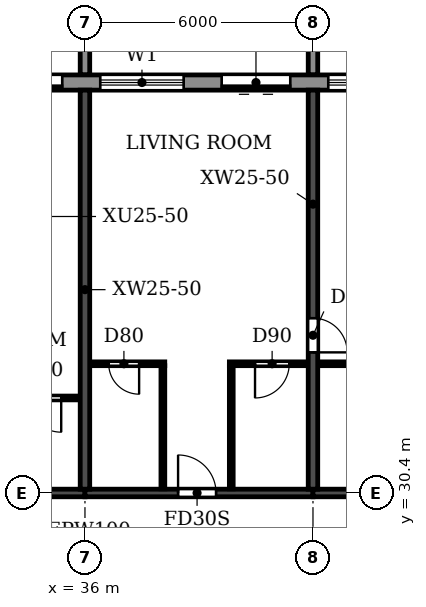
"""IFC4 building model, lengths in metres.
Left out: names, types, materials, properties, quantities, classifications, styles, units other than length and angle.
Written with IfcOpenShell. Run it as: python <this file> out.ifc"""

import sys

from ifc_helpers import new_model, si_unit, direction, frame, frame_2d, origin, place, context, subcontext, project, spatial, polyline, rectangle, outline, extrude, source, transform, mapped, element, fill, save


model = new_model("IFC4")
c1 = context("Model", 3, precision=1e-05, world=origin(), true_north=direction((0.0, 1.0)))
c2 = subcontext(c1, "Body", "Model", "MODEL_VIEW")
j1 = project(units=[si_unit("LENGTHUNIT", "METRE"), si_unit("PLANEANGLEUNIT", "RADIAN")], contexts=[c1])
p1 = place(None, origin())
s1 = spatial("IfcSite", under=j1, at=p1, CompositionType="ELEMENT")
p2 = place(p1, origin())
s2 = spatial("IfcBuilding", under=s1, at=p2, CompositionType="ELEMENT")
p3 = place(p2, frame((0.0, 0.0, 257.7)))
s3 = spatial("IfcBuildingStorey", under=s2, at=p3, CompositionType="ELEMENT", Elevation=257.7)
p4 = place(p3, frame((36.0, 30.5, 0.0), z_axis=(0.0, 0.0, 1.0), x_axis=(0.0, 1.0, 0.0)))
e1 = element("IfcWall", 1, at=p4, inside=s3, PredefinedType="SHEAR", context=c2, shape_type="SweptSolid", body=[
    extrude(rectangle(XDim=10.5, YDim=0.25, at=frame_2d((5.25, 0.0))), origin(), (0.0, 0.0, 1.0), 3.0),
])
p5 = place(p3, frame((42.0, 30.5, 0.0), z_axis=(0.0, 0.0, 1.0), x_axis=(0.0, 1.0, 0.0)))
e2 = element("IfcWall", 2, at=p5, inside=s3, PredefinedType="SHEAR", context=c2, shape_type="SweptSolid", body=[
    extrude(rectangle(XDim=10.5, YDim=0.25, at=frame_2d((5.25, 0.0))), origin(), (0.0, 0.0, 1.0), 3.0),
])
p6 = place(p5, frame((3.6, 0.0, 0.0)))
e3 = element("IfcOpeningElement", 3, at=p6, cuts=e2, PredefinedType="OPENING", context=c2, shape_type="SweptSolid", body=[
    extrude(rectangle(XDim=0.9, YDim=2.1, at=frame_2d((0.45, 1.05))), frame((0.0, 0.135, 0.0), z_axis=(0.0, -1.0, 0.0), x_axis=(1.0, 0.0, 0.0)), (0.0, 0.0, 1.0), 0.27),
])
p7 = place(p3, frame((30.0, 30.4, 0.0), z_axis=(0.0, 0.0, 1.0), x_axis=(1.0, 0.0, 0.0)))
e4 = element("IfcWall", 4, at=p7, inside=s3, PredefinedType="SHEAR", context=c2, shape_type="SweptSolid", body=[
    extrude(rectangle(XDim=6.0, YDim=0.2, at=frame_2d((3.0, 0.0))), origin(), (0.0, 0.0, 1.0), 2.4),
])
p8 = place(p7, frame((2.45, 0.0, 0.0)))
e5 = element("IfcOpeningElement", 5, at=p8, cuts=e4, PredefinedType="OPENING", context=c2, shape_type="SweptSolid", body=[
    extrude(rectangle(XDim=1.0, YDim=2.1, at=frame_2d((0.5, 1.05))), frame((0.0, 0.11, 0.0), z_axis=(0.0, -1.0, 0.0), x_axis=(1.0, 0.0, 0.0)), (0.0, 0.0, 1.0), 0.22),
])
p9 = place(p3, frame((36.0, 30.4, 0.0), z_axis=(0.0, 0.0, 1.0), x_axis=(1.0, 0.0, 0.0)))
e6 = element("IfcWall", 6, at=p9, inside=s3, PredefinedType="SHEAR", context=c2, shape_type="SweptSolid", body=[
    extrude(rectangle(XDim=6.0, YDim=0.2, at=frame_2d((3.0, 0.0))), origin(), (0.0, 0.0, 1.0), 2.4),
])
p10 = place(p9, frame((2.45, 0.0, 0.0)))
e7 = element("IfcOpeningElement", 7, at=p10, cuts=e6, PredefinedType="OPENING", context=c2, shape_type="SweptSolid", body=[
    extrude(rectangle(XDim=1.0, YDim=2.1, at=frame_2d((0.5, 1.05))), frame((0.0, 0.11, 0.0), z_axis=(0.0, -1.0, 0.0), x_axis=(1.0, 0.0, 0.0)), (0.0, 0.0, 1.0), 0.22),
])
p11 = place(p3, frame((42.0, 30.4, 0.0), z_axis=(0.0, 0.0, 1.0), x_axis=(1.0, 0.0, 0.0)))
e8 = element("IfcWall", 8, at=p11, inside=s3, PredefinedType="SHEAR", context=c2, shape_type="SweptSolid", body=[
    extrude(rectangle(XDim=6.0, YDim=0.2, at=frame_2d((3.0, 0.0))), origin(), (0.0, 0.0, 1.0), 2.4),
])
p12 = place(p3, frame((79.317, 41.2, 0.0), z_axis=(0.0, 0.0, 1.0), x_axis=(-1.0, 0.0, 0.0)))
e9 = element("IfcWall", 9, at=p12, inside=s3, PredefinedType="STANDARD", context=c2, shape_type="SweptSolid", body=[
    extrude(rectangle(XDim=56.634, YDim=0.4, at=frame_2d((28.317, 0.0))), origin(), (0.0, 0.0, 1.0), 3.0),
])
p13 = place(p12, frame((52.717, 0.0, 0.9)))
e10 = element("IfcOpeningElement", 10, at=p13, cuts=e9, PredefinedType="OPENING", context=c2, shape_type="SweptSolid", body=[
    extrude(rectangle(XDim=2.2, YDim=1.5, at=frame_2d((1.1, 0.75))), frame((0.0, 0.21, 0.0), z_axis=(0.0, -1.0, 0.0), x_axis=(1.0, 0.0, 0.0)), (0.0, 0.0, 1.0), 0.42),
])
p14 = place(p12, frame((49.717, 0.0, 0.9)))
e11 = element("IfcOpeningElement", 11, at=p14, cuts=e9, PredefinedType="OPENING", context=c2, shape_type="SweptSolid", body=[
    extrude(rectangle(XDim=2.2, YDim=1.5, at=frame_2d((1.1, 0.75))), frame((0.0, 0.21, 0.0), z_axis=(0.0, -1.0, 0.0), x_axis=(1.0, 0.0, 0.0)), (0.0, 0.0, 1.0), 0.42),
])
p15 = place(p12, frame((46.717, 0.0, 0.9)))
e12 = element("IfcOpeningElement", 12, at=p15, cuts=e9, PredefinedType="OPENING", context=c2, shape_type="SweptSolid", body=[
    extrude(rectangle(XDim=2.2, YDim=1.5, at=frame_2d((1.1, 0.75))), frame((0.0, 0.21, 0.0), z_axis=(0.0, -1.0, 0.0), x_axis=(1.0, 0.0, 0.0)), (0.0, 0.0, 1.0), 0.42),
])
p16 = place(p12, frame((43.917, 0.0, 0.0)))
e13 = element("IfcOpeningElement", 13, at=p16, cuts=e9, PredefinedType="OPENING", context=c2, shape_type="SweptSolid", body=[
    extrude(rectangle(XDim=1.8, YDim=2.4, at=frame_2d((0.9, 1.2))), frame((0.0, 0.21, 0.0), z_axis=(0.0, -1.0, 0.0), x_axis=(1.0, 0.0, 0.0)), (0.0, 0.0, 1.0), 0.42),
])
p17 = place(p12, frame((40.717, 0.0, 0.9)))
e14 = element("IfcOpeningElement", 14, at=p17, cuts=e9, PredefinedType="OPENING", context=c2, shape_type="SweptSolid", body=[
    extrude(rectangle(XDim=2.2, YDim=1.5, at=frame_2d((1.1, 0.75))), frame((0.0, 0.21, 0.0), z_axis=(0.0, -1.0, 0.0), x_axis=(1.0, 0.0, 0.0)), (0.0, 0.0, 1.0), 0.42),
])
p18 = place(p12, frame((37.917, 0.0, 0.0)))
e15 = element("IfcOpeningElement", 15, at=p18, cuts=e9, PredefinedType="OPENING", context=c2, shape_type="SweptSolid", body=[
    extrude(rectangle(XDim=1.8, YDim=2.4, at=frame_2d((0.9, 1.2))), frame((0.0, 0.21, 0.0), z_axis=(0.0, -1.0, 0.0), x_axis=(1.0, 0.0, 0.0)), (0.0, 0.0, 1.0), 0.42),
])
p19 = place(p12, frame((34.717, 0.0, 0.9)))
e16 = element("IfcOpeningElement", 16, at=p19, cuts=e9, PredefinedType="OPENING", context=c2, shape_type="SweptSolid", body=[
    extrude(rectangle(XDim=2.2, YDim=1.5, at=frame_2d((1.1, 0.75))), frame((0.0, 0.21, 0.0), z_axis=(0.0, -1.0, 0.0), x_axis=(1.0, 0.0, 0.0)), (0.0, 0.0, 1.0), 0.42),
])
p20 = place(p12, frame((31.717, 0.0, 0.9)))
e17 = element("IfcOpeningElement", 17, at=p20, cuts=e9, PredefinedType="OPENING", context=c2, shape_type="SweptSolid", body=[
    extrude(rectangle(XDim=2.2, YDim=1.5, at=frame_2d((1.1, 0.75))), frame((0.0, 0.21, 0.0), z_axis=(0.0, -1.0, 0.0), x_axis=(1.0, 0.0, 0.0)), (0.0, 0.0, 1.0), 0.42),
])
p21 = place(p12, frame((28.717, 0.0, 0.9)))
e18 = element("IfcOpeningElement", 18, at=p21, cuts=e9, PredefinedType="OPENING", context=c2, shape_type="SweptSolid", body=[
    extrude(rectangle(XDim=2.2, YDim=1.5, at=frame_2d((1.1, 0.75))), frame((0.0, 0.21, 0.0), z_axis=(0.0, -1.0, 0.0), x_axis=(1.0, 0.0, 0.0)), (0.0, 0.0, 1.0), 0.42),
])
p22 = place(p12, frame((25.917, 0.0, 0.0)))
e19 = element("IfcOpeningElement", 19, at=p22, cuts=e9, PredefinedType="OPENING", context=c2, shape_type="SweptSolid", body=[
    extrude(rectangle(XDim=1.8, YDim=2.4, at=frame_2d((0.9, 1.2))), frame((0.0, 0.21, 0.0), z_axis=(0.0, -1.0, 0.0), x_axis=(1.0, 0.0, 0.0)), (0.0, 0.0, 1.0), 0.42),
])
p23 = place(p12, frame((22.917, 0.0, 0.0)))
e20 = element("IfcOpeningElement", 20, at=p23, cuts=e9, PredefinedType="OPENING", context=c2, shape_type="SweptSolid", body=[
    extrude(rectangle(XDim=1.8, YDim=2.4, at=frame_2d((0.9, 1.2))), frame((0.0, 0.21, 0.0), z_axis=(0.0, -1.0, 0.0), x_axis=(1.0, 0.0, 0.0)), (0.0, 0.0, 1.0), 0.42),
])
p24 = place(p12, frame((19.717, 0.0, 0.9)))
e21 = element("IfcOpeningElement", 21, at=p24, cuts=e9, PredefinedType="OPENING", context=c2, shape_type="SweptSolid", body=[
    extrude(rectangle(XDim=2.2, YDim=1.5, at=frame_2d((1.1, 0.75))), frame((0.0, 0.21, 0.0), z_axis=(0.0, -1.0, 0.0), x_axis=(1.0, 0.0, 0.0)), (0.0, 0.0, 1.0), 0.42),
])
p25 = place(p12, frame((16.717, 0.0, 0.9)))
e22 = element("IfcOpeningElement", 22, at=p25, cuts=e9, PredefinedType="OPENING", context=c2, shape_type="SweptSolid", body=[
    extrude(rectangle(XDim=2.2, YDim=1.5, at=frame_2d((1.1, 0.75))), frame((0.0, 0.21, 0.0), z_axis=(0.0, -1.0, 0.0), x_axis=(1.0, 0.0, 0.0)), (0.0, 0.0, 1.0), 0.42),
])
p26 = place(p12, frame((13.717, 0.0, 0.9)))
e23 = element("IfcOpeningElement", 23, at=p26, cuts=e9, PredefinedType="OPENING", context=c2, shape_type="SweptSolid", body=[
    extrude(rectangle(XDim=2.2, YDim=1.5, at=frame_2d((1.1, 0.75))), frame((0.0, 0.21, 0.0), z_axis=(0.0, -1.0, 0.0), x_axis=(1.0, 0.0, 0.0)), (0.0, 0.0, 1.0), 0.42),
])
p27 = place(p12, frame((10.717, 0.0, 0.9)))
e24 = element("IfcOpeningElement", 24, at=p27, cuts=e9, PredefinedType="OPENING", context=c2, shape_type="SweptSolid", body=[
    extrude(rectangle(XDim=2.2, YDim=1.5, at=frame_2d((1.1, 0.75))), frame((0.0, 0.21, 0.0), z_axis=(0.0, -1.0, 0.0), x_axis=(1.0, 0.0, 0.0)), (0.0, 0.0, 1.0), 0.42),
])
p28 = place(p12, frame((7.917, 0.0, 0.0)))
e25 = element("IfcOpeningElement", 25, at=p28, cuts=e9, PredefinedType="OPENING", context=c2, shape_type="SweptSolid", body=[
    extrude(rectangle(XDim=1.8, YDim=2.4, at=frame_2d((0.9, 1.2))), frame((0.0, 0.21, 0.0), z_axis=(0.0, -1.0, 0.0), x_axis=(1.0, 0.0, 0.0)), (0.0, 0.0, 1.0), 0.42),
])
p29 = place(p12, frame((4.717, 0.0, 0.9)))
e26 = element("IfcOpeningElement", 26, at=p29, cuts=e9, PredefinedType="OPENING", context=c2, shape_type="SweptSolid", body=[
    extrude(rectangle(XDim=2.2, YDim=1.5, at=frame_2d((1.1, 0.75))), frame((0.0, 0.21, 0.0), z_axis=(0.0, -1.0, 0.0), x_axis=(1.0, 0.0, 0.0)), (0.0, 0.0, 1.0), 0.42),
])
p30 = place(p12, frame((1.917, 0.0, 0.0)))
e27 = element("IfcOpeningElement", 27, at=p30, cuts=e9, PredefinedType="OPENING", context=c2, shape_type="SweptSolid", body=[
    extrude(rectangle(XDim=1.8, YDim=2.4, at=frame_2d((0.9, 1.2))), frame((0.0, 0.21, 0.0), z_axis=(0.0, -1.0, 0.0), x_axis=(1.0, 0.0, 0.0)), (0.0, 0.0, 1.0), 0.42),
])
m1 = source(origin(), c2, "Body", "SweptSolid", [
    extrude(outline(polyline([(0.0, 0.0), (0.25, 0.0), (0.25, 3.1), (0.0, 3.1), (0.0, 0.0)])), origin(), (0.0, 0.0, 1.0), 3.1),
])
for number, where in (
    (28, (35.875, 41.4, 0.0)),
    (29, (41.875, 41.4, 0.0)),
):
    element("IfcWall", number, at=place(p3, frame(where)), inside=s3, PredefinedType="STANDARD", context=c2, shape_type="MappedRepresentation", body=[
        mapped(m1, transform((0.0, 0.0, 0.0))),
    ])
p31 = place(p3, frame((33.8, 32.9, 0.0), z_axis=(0.0, 0.0, 1.0), x_axis=(1.0, 0.0, 0.0)))
e30 = element("IfcWall", 30, at=p31, inside=s3, PredefinedType="PARTITIONING", context=c2, shape_type="SweptSolid", body=[
    extrude(rectangle(XDim=2.065, YDim=0.1, at=frame_2d((1.032, 0.0))), origin(), (0.0, 0.0, 1.0), 3.0),
])
p32 = place(p31, frame((0.675, 0.0, 0.0)))
e31 = element("IfcOpeningElement", 31, at=p32, cuts=e30, PredefinedType="OPENING", context=c2, shape_type="SweptSolid", body=[
    extrude(rectangle(XDim=0.9, YDim=2.1, at=frame_2d((0.45, 1.05))), frame((0.0, 0.06, 0.0), z_axis=(0.0, -1.0, 0.0), x_axis=(1.0, 0.0, 0.0)), (0.0, 0.0, 1.0), 0.12),
])
p33 = place(p3, frame((36.135, 33.8, 0.0), z_axis=(0.0, 0.0, 1.0), x_axis=(1.0, 0.0, 0.0)))
e32 = element("IfcWall", 32, at=p33, inside=s3, PredefinedType="PARTITIONING", context=c2, shape_type="SweptSolid", body=[
    extrude(rectangle(XDim=1.965, YDim=0.1, at=frame_2d((0.982, 0.0))), origin(), (0.0, 0.0, 1.0), 3.0),
])
p34 = place(p33, frame((0.49, 0.0, 0.0)))
e33 = element("IfcOpeningElement", 33, at=p34, cuts=e32, PredefinedType="OPENING", context=c2, shape_type="SweptSolid", body=[
    extrude(rectangle(XDim=0.8, YDim=2.1, at=frame_2d((0.4, 1.05))), frame((0.0, 0.06, 0.0), z_axis=(0.0, -1.0, 0.0), x_axis=(1.0, 0.0, 0.0)), (0.0, 0.0, 1.0), 0.12),
])
p35 = place(p3, frame((39.8, 33.8, 0.0), z_axis=(0.0, 0.0, 1.0), x_axis=(1.0, 0.0, 0.0)))
e34 = element("IfcWall", 34, at=p35, inside=s3, PredefinedType="PARTITIONING", context=c2, shape_type="SweptSolid", body=[
    extrude(rectangle(XDim=2.065, YDim=0.1, at=frame_2d((1.032, 0.0))), origin(), (0.0, 0.0, 1.0), 3.0),
])
p36 = place(p35, frame((0.675, 0.0, 0.0)))
e35 = element("IfcOpeningElement", 35, at=p36, cuts=e34, PredefinedType="OPENING", context=c2, shape_type="SweptSolid", body=[
    extrude(rectangle(XDim=0.9, YDim=2.1, at=frame_2d((0.45, 1.05))), frame((0.0, 0.06, 0.0), z_axis=(0.0, -1.0, 0.0), x_axis=(1.0, 0.0, 0.0)), (0.0, 0.0, 1.0), 0.12),
])
p37 = place(p3, frame((42.135, 33.8, 0.0), z_axis=(0.0, 0.0, 1.0), x_axis=(1.0, 0.0, 0.0)))
e36 = element("IfcWall", 36, at=p37, inside=s3, PredefinedType="PARTITIONING", context=c2, shape_type="SweptSolid", body=[
    extrude(rectangle(XDim=2.965, YDim=0.1, at=frame_2d((1.482, 0.0))), origin(), (0.0, 0.0, 1.0), 3.0),
])
p38 = place(p37, frame((0.965, 0.0, 0.0)))
e37 = element("IfcOpeningElement", 37, at=p38, cuts=e36, PredefinedType="OPENING", context=c2, shape_type="SweptSolid", body=[
    extrude(rectangle(XDim=0.8, YDim=2.1, at=frame_2d((0.4, 1.05))), frame((0.0, 0.06, 0.0), z_axis=(0.0, -1.0, 0.0), x_axis=(1.0, 0.0, 0.0)), (0.0, 0.0, 1.0), 0.12),
])
for number, where, z_axis, x_axis in (
    (38, (38.05, 30.51, 0.0), (0.0, 0.0, 1.0), (0.0, 1.0, 0.0)),
    (39, (39.85, 30.51, 0.0), (0.0, 0.0, 1.0), (0.0, 1.0, 0.0)),
):
    element("IfcWall", number, at=place(p3, frame(where, z_axis=z_axis, x_axis=x_axis)), inside=s3, PredefinedType="PARTITIONING", context=c2, shape_type="SweptSolid", body=[
        extrude(rectangle(XDim=3.24, YDim=0.1, at=frame_2d((1.62, 0.0))), origin(), (0.0, 0.0, 1.0), 3.0),
    ])
p39 = place(p16, origin())
e40 = element("IfcDoor", 40, at=p39, inside=s3, OperationType="DOUBLE_DOOR_SLIDING", PredefinedType="DOOR", context=c2, shape_type="SweptSolid", body=[
    extrude(rectangle(XDim=1.8, YDim=2.4, at=frame_2d((0.9, 1.2))), frame((0.0, 0.025, 0.0), z_axis=(0.0, -1.0, 0.0), x_axis=(1.0, 0.0, 0.0)), (0.0, 0.0, 1.0), 0.05),
])
fill(e13, e40)
p40 = place(p17, origin())
e41 = element("IfcWindow", 41, at=p40, inside=s3, PartitioningType="DOUBLE_PANEL_HORIZONTAL", PredefinedType="WINDOW", context=c2, shape_type="SweptSolid", body=[
    extrude(rectangle(XDim=2.2, YDim=1.5, at=frame_2d((1.1, 0.75))), frame((0.0, 0.03, 0.0), z_axis=(0.0, -1.0, 0.0), x_axis=(1.0, 0.0, 0.0)), (0.0, 0.0, 1.0), 0.06),
])
fill(e14, e41)
p41 = place(p18, origin())
e42 = element("IfcDoor", 42, at=p41, inside=s3, OperationType="DOUBLE_DOOR_SLIDING", PredefinedType="DOOR", context=c2, shape_type="SweptSolid", body=[
    extrude(rectangle(XDim=1.8, YDim=2.4, at=frame_2d((0.9, 1.2))), frame((0.0, 0.025, 0.0), z_axis=(0.0, -1.0, 0.0), x_axis=(1.0, 0.0, 0.0)), (0.0, 0.0, 1.0), 0.05),
])
fill(e15, e42)
p42 = place(p19, origin())
e43 = element("IfcWindow", 43, at=p42, inside=s3, PartitioningType="DOUBLE_PANEL_HORIZONTAL", PredefinedType="WINDOW", context=c2, shape_type="SweptSolid", body=[
    extrude(rectangle(XDim=2.2, YDim=1.5, at=frame_2d((1.1, 0.75))), frame((0.0, 0.03, 0.0), z_axis=(0.0, -1.0, 0.0), x_axis=(1.0, 0.0, 0.0)), (0.0, 0.0, 1.0), 0.06),
])
fill(e16, e43)
p43 = place(p32, frame((0.9, 0.0, 0.0), z_axis=(0.0, 0.0, 1.0), x_axis=(-1.0, 0.0, 0.0)))
e44 = element("IfcDoor", 44, at=p43, inside=s3, OperationType="SINGLE_SWING_LEFT", PredefinedType="DOOR", context=c2, shape_type="SweptSolid", body=[
    extrude(rectangle(XDim=0.9, YDim=2.1, at=frame_2d((0.45, 1.05))), frame((0.0, 0.025, 0.0), z_axis=(0.0, -1.0, 0.0), x_axis=(1.0, 0.0, 0.0)), (0.0, 0.0, 1.0), 0.05),
])
fill(e31, e44)
p44 = place(p34, frame((0.8, 0.0, 0.0), z_axis=(0.0, 0.0, 1.0), x_axis=(-1.0, 0.0, 0.0)))
e45 = element("IfcDoor", 45, at=p44, inside=s3, OperationType="SINGLE_SWING_LEFT", PredefinedType="DOOR", context=c2, shape_type="SweptSolid", body=[
    extrude(rectangle(XDim=0.8, YDim=2.1, at=frame_2d((0.4, 1.05))), frame((0.0, 0.025, 0.0), z_axis=(0.0, -1.0, 0.0), x_axis=(1.0, 0.0, 0.0)), (0.0, 0.0, 1.0), 0.05),
])
fill(e33, e45)
p45 = place(p10, origin())
e46 = element("IfcDoor", 46, at=p45, inside=s3, OperationType="SINGLE_SWING_LEFT", PredefinedType="DOOR", context=c2, shape_type="SweptSolid", body=[
    extrude(rectangle(XDim=1.0, YDim=2.1, at=frame_2d((0.5, 1.05))), frame((0.0, 0.025, 0.0), z_axis=(0.0, -1.0, 0.0), x_axis=(1.0, 0.0, 0.0)), (0.0, 0.0, 1.0), 0.05),
])
fill(e7, e46)
p46 = place(p36, frame((0.9, 0.0, 0.0), z_axis=(0.0, 0.0, 1.0), x_axis=(-1.0, 0.0, 0.0)))
e47 = element("IfcDoor", 47, at=p46, inside=s3, OperationType="SINGLE_SWING_RIGHT", PredefinedType="DOOR", context=c2, shape_type="SweptSolid", body=[
    extrude(rectangle(XDim=0.9, YDim=2.1, at=frame_2d((0.45, 1.05))), frame((0.0, 0.025, 0.0), z_axis=(0.0, -1.0, 0.0), x_axis=(1.0, 0.0, 0.0)), (0.0, 0.0, 1.0), 0.05),
])
fill(e35, e47)
p47 = place(p6, frame((0.9, 0.0, 0.0), z_axis=(0.0, 0.0, 1.0), x_axis=(-1.0, 0.0, 0.0)))
e48 = element("IfcDoor", 48, at=p47, inside=s3, OperationType="SINGLE_SWING_RIGHT", PredefinedType="DOOR", context=c2, shape_type="SweptSolid", body=[
    extrude(rectangle(XDim=0.9, YDim=2.1, at=frame_2d((0.45, 1.05))), frame((0.0, 0.025, 0.0), z_axis=(0.0, -1.0, 0.0), x_axis=(1.0, 0.0, 0.0)), (0.0, 0.0, 1.0), 0.05),
])
fill(e3, e48)
save(model, sys.argv[1])
